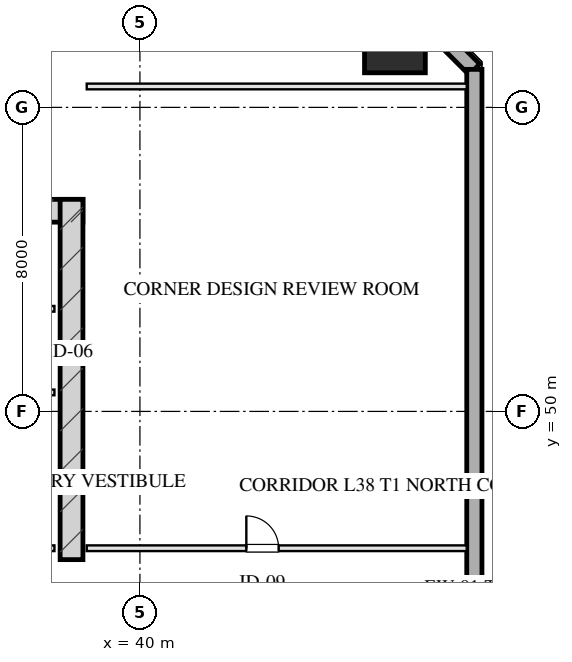
"""IFC4 building model, lengths in metres.
Left out: names, types, materials, properties, quantities, classifications, styles, units other than length and angle.
Written with IfcOpenShell. Run it as: python <this file> out.ifc"""

import sys

from ifc_helpers import new_model, si_unit, direction, frame, frame_2d, origin, origin_2d, place, context, subcontext, project, spatial, rectangle, hollow_rectangle, extrude, element, fill, save


model = new_model("IFC4")
c1 = context("Model", 3, precision=1e-05, world=origin(), true_north=direction((0.0, 1.0)))
c2 = subcontext(c1, "Body", "Model", "MODEL_VIEW")
j1 = project(units=[si_unit("LENGTHUNIT", "METRE"), si_unit("PLANEANGLEUNIT", "RADIAN")], contexts=[c1])
p1 = place(None, origin())
s1 = spatial("IfcSite", under=j1, at=p1, CompositionType="ELEMENT")
p2 = place(p1, origin())
s2 = spatial("IfcBuilding", under=s1, at=p2, CompositionType="ELEMENT")
p3 = place(p2, frame((0.0, 0.0, 146.05)))
s3 = spatial("IfcBuildingStorey", under=s2, at=p3, CompositionType="ELEMENT", Elevation=146.05)
p4 = place(p3, frame((21.5, 55.28, 0.0), z_axis=(0.0, 0.0, 1.0), x_axis=(1.0, 0.0, 0.0)))
e1 = element("IfcWall", 1, at=p4, inside=s3, PredefinedType="SHEAR", context=c2, shape_type="SweptSolid", body=[
    extrude(rectangle(XDim=17.0, YDim=0.6, at=frame_2d((8.5, 0.0))), origin(), (0.0, 0.0, 1.0), 3.45),
])
p5 = place(p3, frame((38.2, 46.1, 0.0), z_axis=(0.0, 0.0, 1.0), x_axis=(0.0, 1.0, 0.0)))
e2 = element("IfcWall", 2, at=p5, inside=s3, PredefinedType="SHEAR", context=c2, shape_type="SweptSolid", body=[
    extrude(rectangle(XDim=9.48, YDim=0.6, at=frame_2d((4.74, 0.0))), origin(), (0.0, 0.0, 1.0), 3.45),
])
p6 = place(p3, frame((46.71, 59.71, 0.0), z_axis=(0.0, 0.0, 1.0), x_axis=(1.0, 0.0, 0.0)))
e3 = element("IfcColumn", 3, at=p6, inside=s3, PredefinedType="COLUMN", context=c2, shape_type="SweptSolid", body=[
    extrude(hollow_rectangle(XDim=1.6, YDim=1.6, WallThickness=0.055, at=origin_2d()), origin(), (0.0, 0.0, 1.0), 3.451),
])
p7 = place(p3, frame((46.0, 61.8, 0.0), z_axis=(0.0, 0.0, 1.0), x_axis=(0.707106781187, -0.707106781187, 0.0)))
e4 = element("IfcWall", 4, at=p7, inside=s3, PredefinedType="SOLIDWALL", context=c2, shape_type="SweptSolid", body=[
    extrude(rectangle(XDim=3.96, YDim=0.4, at=frame_2d((1.98, 0.0))), origin(), (0.0, 0.0, 1.0), 2.61),
])
p8 = place(p3, frame((48.8, 59.0, 0.0), z_axis=(0.0, 0.0, 1.0), x_axis=(0.0, -1.0, 0.0)))
e5 = element("IfcWall", 5, at=p8, inside=s3, PredefinedType="SOLIDWALL", context=c2, shape_type="SweptSolid", body=[
    extrude(rectangle(XDim=50.0, YDim=0.4, at=frame_2d((25.0, 0.0))), origin(), (0.0, 0.0, 1.0), 2.61),
])
p9 = place(p8, frame((17.475, 0.0, 0.75)))
e6 = element("IfcOpeningElement", 6, at=p9, cuts=e5, PredefinedType="OPENING", context=c2, shape_type="SweptSolid", body=[
    extrude(rectangle(XDim=2.25, YDim=1.46, at=frame_2d((1.125, 0.73))), frame((0.0, 0.21, 0.0), z_axis=(0.0, -1.0, 0.0), x_axis=(1.0, 0.0, 0.0)), (0.0, 0.0, 1.0), 0.42),
])
p10 = place(p8, frame((30.258, 0.0, 0.0)))
e7 = element("IfcOpeningElement", 7, at=p10, cuts=e5, PredefinedType="OPENING", context=c2, shape_type="SweptSolid", body=[
    extrude(rectangle(XDim=1.1, YDim=2.15, at=frame_2d((0.55, 1.075))), frame((0.0, 0.21, 0.0), z_axis=(0.0, -1.0, 0.0), x_axis=(1.0, 0.0, 0.0)), (0.0, 0.0, 1.0), 0.42),
])
p11 = place(p3, frame((33.95, 46.4, 0.0), z_axis=(0.0, 0.0, 1.0), x_axis=(1.0, 0.0, 0.0)))
e8 = element("IfcWall", 8, at=p11, inside=s3, PredefinedType="PARTITIONING", context=c2, shape_type="SweptSolid", body=[
    extrude(rectangle(XDim=3.8, YDim=0.15, at=frame_2d((1.9, 0.0))), origin(), (0.0, 0.0, 1.0), 3.175),
])
p12 = place(p11, frame((0.22, 0.0, 0.0)))
e9 = element("IfcOpeningElement", 9, at=p12, cuts=e8, PredefinedType="OPENING", context=c2, shape_type="SweptSolid", body=[
    extrude(rectangle(XDim=0.95, YDim=2.05, at=frame_2d((0.475, 1.025))), frame((0.0, 0.085, 0.0), z_axis=(0.0, -1.0, 0.0), x_axis=(1.0, 0.0, 0.0)), (0.0, 0.0, 1.0), 0.17),
])
for number, where, z_axis, x_axis in (
    (10, (35.45, 50.5, 0.0), (0.0, 0.0, 1.0), (1.0, 0.0, 0.0)),
    (11, (35.45, 52.7, 0.0), (0.0, 0.0, 1.0), (1.0, 0.0, 0.0)),
):
    element("IfcWall", number, at=place(p3, frame(where, z_axis=z_axis, x_axis=x_axis)), inside=s3, PredefinedType="PARTITIONING", context=c2, shape_type="SweptSolid", body=[
        extrude(rectangle(XDim=2.3, YDim=0.15, at=frame_2d((1.15, 0.0))), origin(), (0.0, 0.0, 1.0), 3.175),
    ])
p13 = place(p3, frame((38.6, 58.55, 0.0), z_axis=(0.0, 0.0, 1.0), x_axis=(1.0, 0.0, 0.0)))
e12 = element("IfcWall", 12, at=p13, inside=s3, PredefinedType="PARTITIONING", context=c2, shape_type="SweptSolid", body=[
    extrude(rectangle(XDim=10.0, YDim=0.15, at=frame_2d((5.0, 0.0))), origin(), (0.0, 0.0, 1.0), 3.175),
])
p14 = place(p3, frame((38.6, 46.4, 0.0), z_axis=(0.0, 0.0, 1.0), x_axis=(1.0, 0.0, 0.0)))
e13 = element("IfcWall", 13, at=p14, inside=s3, PredefinedType="PARTITIONING", context=c2, shape_type="SweptSolid", body=[
    extrude(rectangle(XDim=10.0, YDim=0.15, at=frame_2d((5.0, 0.0))), origin(), (0.0, 0.0, 1.0), 3.175),
])
p15 = place(p14, frame((4.2, 0.0, 0.0)))
e14 = element("IfcOpeningElement", 14, at=p15, cuts=e13, PredefinedType="OPENING", context=c2, shape_type="SweptSolid", body=[
    extrude(rectangle(XDim=0.85, YDim=2.05, at=frame_2d((0.425, 1.025))), frame((0.0, 0.085, 0.0), z_axis=(0.0, -1.0, 0.0), x_axis=(1.0, 0.0, 0.0)), (0.0, 0.0, 1.0), 0.17),
])
p16 = place(p15, origin())
e15 = element("IfcDoor", 15, at=p16, inside=s3, OperationType="SINGLE_SWING_LEFT", PredefinedType="DOOR", context=c2, shape_type="SweptSolid", body=[
    extrude(rectangle(XDim=0.85, YDim=2.05, at=frame_2d((0.425, 1.025))), frame((0.0, 0.025, 0.0), z_axis=(0.0, -1.0, 0.0), x_axis=(1.0, 0.0, 0.0)), (0.0, 0.0, 1.0), 0.05),
])
fill(e14, e15)
save(model, sys.argv[1])
